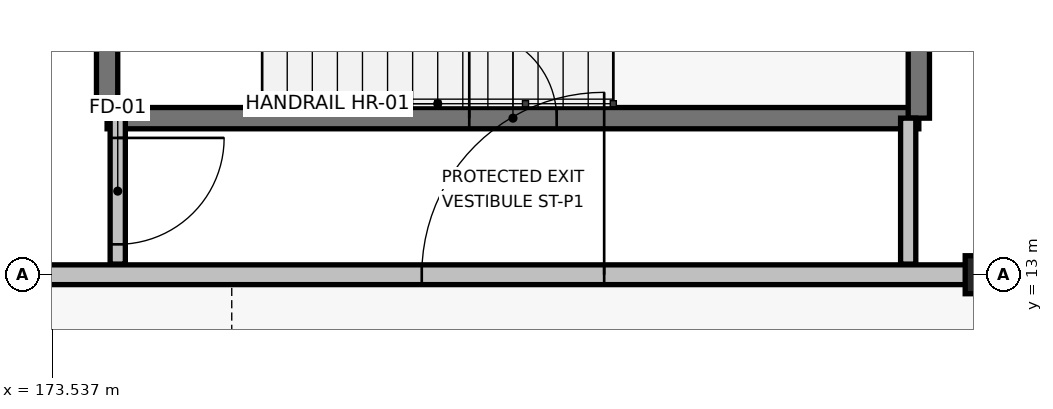
"""IFC4 building model, lengths in metres.
Left out: names, types, materials, properties, quantities, classifications, styles, units other than length and angle.
Written with IfcOpenShell. Run it as: python <this file> out.ifc"""

import sys

from ifc_helpers import new_model, si_unit, direction, frame, frame_2d, origin, origin_2d, place, context, subcontext, project, spatial, rectangle, i_section, extrude, element, fill, save


model = new_model("IFC4")
c1 = context("Model", 3, precision=1e-05, world=origin(), true_north=direction((0.0, 1.0)))
c2 = subcontext(c1, "Body", "Model", "MODEL_VIEW")
j1 = project(units=[si_unit("LENGTHUNIT", "METRE"), si_unit("PLANEANGLEUNIT", "RADIAN")], contexts=[c1])
p1 = place(None, origin())
s1 = spatial("IfcSite", under=j1, at=p1, CompositionType="ELEMENT")
p2 = place(p1, origin())
s2 = spatial("IfcBuilding", under=s1, at=p2, CompositionType="ELEMENT")
p3 = place(p2, origin())
s3 = spatial("IfcBuildingStorey", under=s2, at=p3, CompositionType="ELEMENT", Elevation=0.0)
p4 = place(p3, frame((185.7, 13.0, 0.0), z_axis=(0.0, 0.0, 1.0), x_axis=(1.0, 0.0, 0.0)))
e1 = element("IfcColumn", 1, at=p4, inside=s3, PredefinedType="COLUMN", context=c2, shape_type="SweptSolid", body=[
    extrude(i_section(OverallWidth=0.3, OverallDepth=0.5, WebThickness=0.014, FlangeThickness=0.028, FilletRadius=0.027, at=origin_2d()), origin(), (0.0, 0.0, 1.0), 5.4),
])
p5 = place(p3, frame((171.55, 13.0, 0.0), z_axis=(0.0, 0.0, 1.0), x_axis=(1.0, 0.0, 0.0)))
e2 = element("IfcWall", 2, at=p5, inside=s3, PredefinedType="STANDARD", context=c2, shape_type="SweptSolid", body=[
    extrude(rectangle(XDim=14.15, YDim=0.26, at=frame_2d((7.075, 0.0))), origin(), (0.0, 0.0, 1.0), 4.625),
])
p6 = place(p5, frame((9.25, 0.0, 0.0), z_axis=(0.0, 0.0, 1.0), x_axis=(-1.0, 0.0, 0.0)))
e3 = element("IfcOpeningElement", 3, at=p6, cuts=e2, PredefinedType="OPENING", context=c2, shape_type="SweptSolid", body=[
    extrude(rectangle(XDim=2.4, YDim=2.4, at=frame_2d((1.2, 1.2))), frame((0.0, 0.14, 0.0), z_axis=(0.0, -1.0, 0.0), x_axis=(1.0, 0.0, 0.0)), (0.0, 0.0, 1.0), 0.28),
])
p7 = place(p3, frame((174.26, 15.06, -0.45), z_axis=(0.0, 0.0, 1.0), x_axis=(1.0, 0.0, 0.0)))
e4 = element("IfcWall", 4, at=p7, inside=s3, PredefinedType="SHEAR", context=c2, shape_type="SweptSolid", body=[
    extrude(rectangle(XDim=10.68, YDim=0.28, at=frame_2d((5.34, 0.0))), origin(), (0.0, 0.0, 1.0), 5.63),
])
p8 = place(p7, frame((4.765, 0.0, 0.45)))
e5 = element("IfcOpeningElement", 5, at=p8, cuts=e4, PredefinedType="OPENING", context=c2, shape_type="SweptSolid", body=[
    extrude(rectangle(XDim=1.15, YDim=2.2, at=frame_2d((0.575, 1.1))), frame((0.0, 0.15, 0.0), z_axis=(0.0, -1.0, 0.0), x_axis=(1.0, 0.0, 0.0)), (0.0, 0.0, 1.0), 0.3),
])
for number, where, z_axis, x_axis in (
    (6, (184.94, 15.06, -0.45), (0.0, 0.0, 1.0), (0.0, 1.0, 0.0)),
    (7, (174.26, 19.34, -0.45), (0.0, 0.0, 1.0), (0.0, -1.0, 0.0)),
):
    element("IfcWall", number, at=place(p3, frame(where, z_axis=z_axis, x_axis=x_axis)), inside=s3, PredefinedType="SHEAR", context=c2, shape_type="SweptSolid", body=[
        extrude(rectangle(XDim=4.28, YDim=0.28, at=frame_2d((2.14, 0.0))), origin(), (0.0, 0.0, 1.0), 5.63),
    ])
p9 = place(p3, frame((184.8, 13.14, 0.0), z_axis=(0.0, 0.0, 1.0), x_axis=(0.0, 1.0, 0.0)))
e8 = element("IfcWall", 8, at=p9, inside=s3, PredefinedType="PARTITIONING", context=c2, shape_type="SweptSolid", body=[
    extrude(rectangle(XDim=1.92, YDim=0.2, at=frame_2d((0.96, 0.0))), origin(), (0.0, 0.0, 1.0), 5.16),
])
p10 = place(p3, frame((174.4, 15.06, 0.0), z_axis=(0.0, 0.0, 1.0), x_axis=(0.0, -1.0, 0.0)))
e9 = element("IfcWall", 9, at=p10, inside=s3, PredefinedType="PARTITIONING", context=c2, shape_type="SweptSolid", body=[
    extrude(rectangle(XDim=1.92, YDim=0.2, at=frame_2d((0.96, 0.0))), origin(), (0.0, 0.0, 1.0), 5.16),
])
p11 = place(p10, frame((0.26, 0.0, 0.0)))
e10 = element("IfcOpeningElement", 10, at=p11, cuts=e9, PredefinedType="OPENING", context=c2, shape_type="SweptSolid", body=[
    extrude(rectangle(XDim=1.4, YDim=2.2, at=frame_2d((0.7, 1.1))), frame((0.0, 0.11, 0.0), z_axis=(0.0, -1.0, 0.0), x_axis=(1.0, 0.0, 0.0)), (0.0, 0.0, 1.0), 0.22),
])
p12 = place(p6, origin())
e11 = element("IfcDoor", 11, at=p12, inside=s3, OperationType="SINGLE_SWING_RIGHT", PredefinedType="DOOR", context=c2, shape_type="SweptSolid", body=[
    extrude(rectangle(XDim=2.4, YDim=2.4, at=frame_2d((1.2, 1.2))), frame((0.0, 0.025, 0.0), z_axis=(0.0, -1.0, 0.0), x_axis=(1.0, 0.0, 0.0)), (0.0, 0.0, 1.0), 0.05),
])
fill(e3, e11)
p13 = place(p8, origin())
e12 = element("IfcDoor", 12, at=p13, inside=s3, OperationType="SINGLE_SWING_LEFT", PredefinedType="DOOR", context=c2, shape_type="SweptSolid", body=[
    extrude(rectangle(XDim=1.15, YDim=2.2, at=frame_2d((0.575, 1.1))), frame((0.0, 0.025, 0.0), z_axis=(0.0, -1.0, 0.0), x_axis=(1.0, 0.0, 0.0)), (0.0, 0.0, 1.0), 0.05),
])
fill(e5, e12)
p14 = place(p11, origin())
e13 = element("IfcDoor", 13, at=p14, inside=s3, OperationType="SINGLE_SWING_LEFT", PredefinedType="DOOR", context=c2, shape_type="SweptSolid", body=[
    extrude(rectangle(XDim=1.4, YDim=2.2, at=frame_2d((0.7, 1.1))), frame((0.0, 0.025, 0.0), z_axis=(0.0, -1.0, 0.0), x_axis=(1.0, 0.0, 0.0)), (0.0, 0.0, 1.0), 0.05),
])
fill(e10, e13)
save(model, sys.argv[1])
